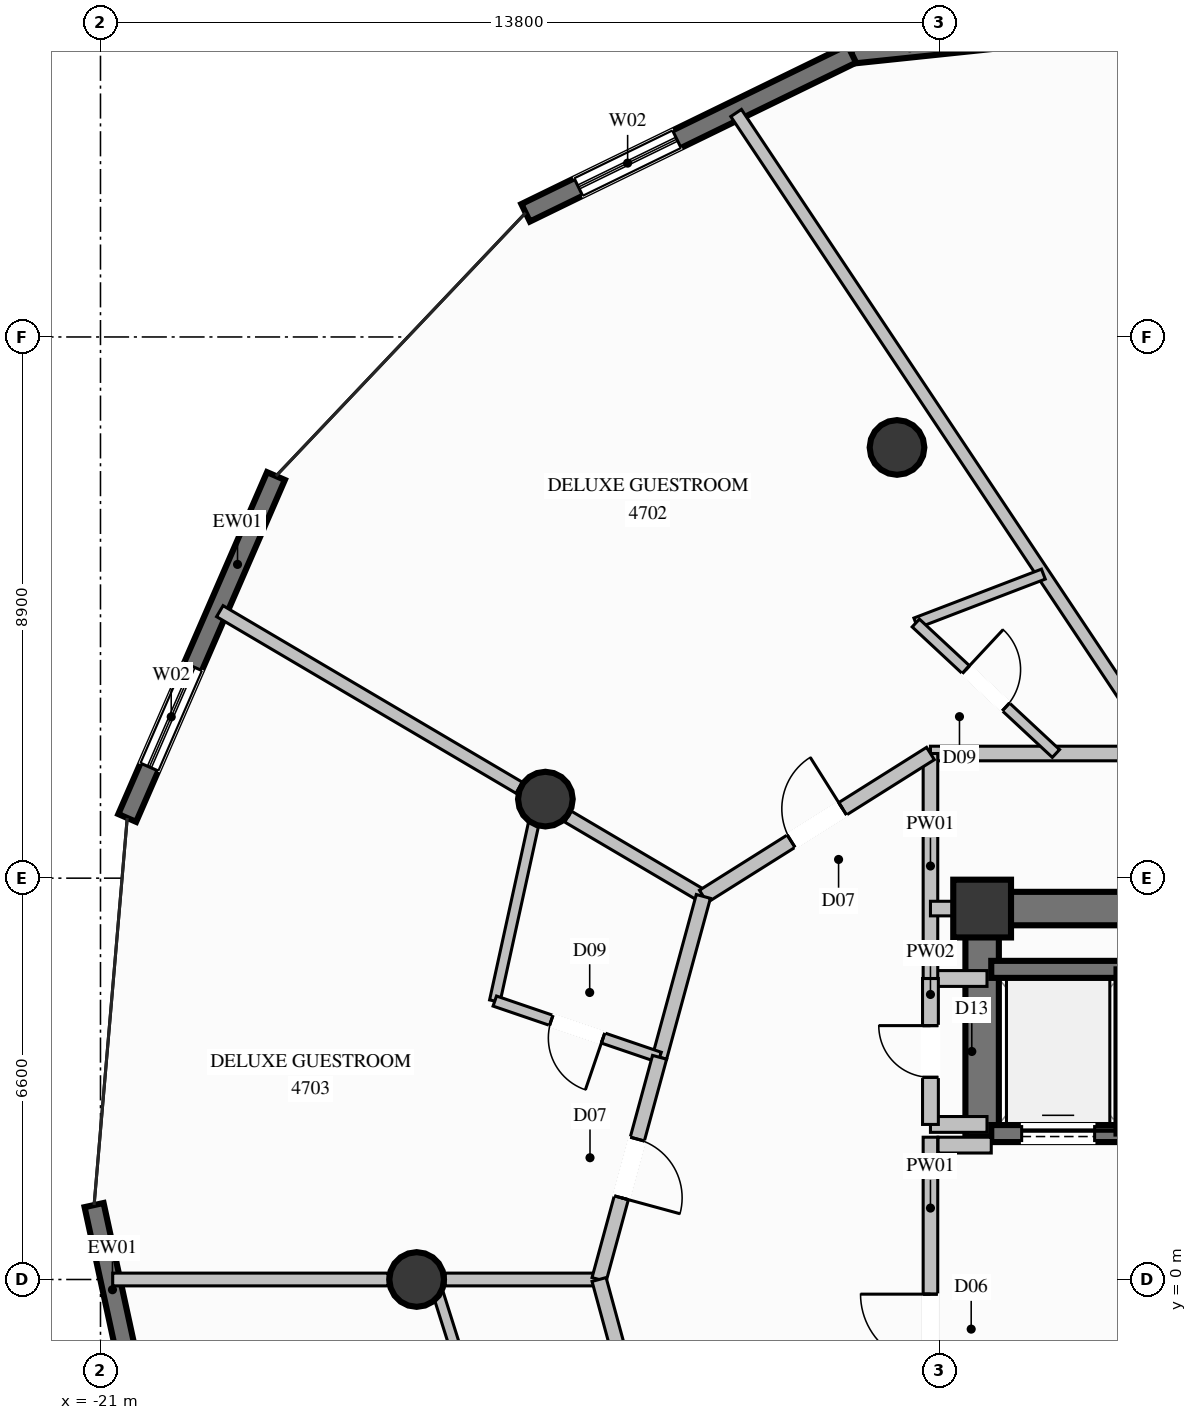
"""IFC4 building model, lengths in metres.
Left out: names, types, materials, properties, quantities, classifications, styles, units other than length and angle.
Written with IfcOpenShell. Run it as: python <this file> out.ifc"""

import sys

from ifc_helpers import new_model, si_unit, direction, frame, frame_2d, origin, origin_2d, place, context, subcontext, project, spatial, rectangle, circle, extrude, element, fill, save


model = new_model("IFC4")
c1 = context("Model", 3, precision=1e-05, world=origin(), true_north=direction((0.0, 1.0)))
c2 = subcontext(c1, "Body", "Model", "MODEL_VIEW")
j1 = project(units=[si_unit("LENGTHUNIT", "METRE"), si_unit("PLANEANGLEUNIT", "RADIAN")], contexts=[c1])
p1 = place(None, origin())
s1 = spatial("IfcSite", under=j1, at=p1, CompositionType="ELEMENT")
p2 = place(p1, origin())
s2 = spatial("IfcBuilding", under=s1, at=p2, CompositionType="ELEMENT")
p3 = place(p2, frame((0.0, 0.0, 176.8)))
s3 = spatial("IfcBuildingStorey", under=s2, at=p3, CompositionType="ELEMENT", Elevation=176.8)
p4 = place(p3, frame((-6.5, 6.1, 0.0), z_axis=(0.0, 0.0, 1.0), x_axis=(1.0, 0.0, 0.0)))
e1 = element("IfcColumn", 1, at=p4, inside=s3, PredefinedType="COLUMN", context=c2, shape_type="SweptSolid", body=[
    extrude(rectangle(XDim=0.95, YDim=0.95, at=origin_2d()), origin(), (0.0, 0.0, 1.0), 3.6),
])
p5 = place(p3, frame((-6.225, 6.1, 0.0), z_axis=(0.0, 0.0, 1.0), x_axis=(1.0, 0.0, 0.0)))
e2 = element("IfcWall", 2, at=p5, inside=s3, PredefinedType="SHEAR", context=c2, shape_type="SweptSolid", body=[
    extrude(rectangle(XDim=2.625, YDim=0.55, at=frame_2d((1.312, 0.0))), origin(), (0.0, 0.0, 1.0), 3.6),
])
p6 = place(p3, frame((-6.5, 2.35, 0.0), z_axis=(0.0, 0.0, 1.0), x_axis=(0.0, 1.0, 0.0)))
e3 = element("IfcWall", 3, at=p6, inside=s3, PredefinedType="SHEAR", context=c2, shape_type="SweptSolid", body=[
    extrude(rectangle(XDim=4.025, YDim=0.55, at=frame_2d((2.012, 0.0))), origin(), (0.0, 0.0, 1.0), 3.6),
])
for number, where, z_axis, x_axis in (
    (4, (-7.9, 13.683, 0.0), (0.0, 0.0, 1.0), (1.0, 0.0, 0.0)),
    (5, (-13.683, 7.9, 0.0), (0.0, 0.0, 1.0), (1.0, 0.0, 0.0)),
    (6, (-15.8, 0.0, 0.0), (0.0, 0.0, 1.0), (1.0, 0.0, 0.0)),
):
    element("IfcColumn", number, at=place(p3, frame(where, z_axis=z_axis, x_axis=x_axis)), inside=s3, PredefinedType="COLUMN", context=c2, shape_type="SweptSolid", body=[
        extrude(circle(Radius=0.45, at=origin_2d()), origin(), (0.0, 0.0, 1.0), 3.6),
    ])
p7 = place(p3, frame((-8.643, 20.155, 0.0), z_axis=(0.0, 0.0, 1.0), x_axis=(0.994556170884, 0.104201837585, 0.0)))
e7 = element("IfcWall", 7, at=p7, inside=s3, PredefinedType="SOLIDWALL", context=c2, shape_type="SweptSolid", body=[
    extrude(rectangle(XDim=6.132, YDim=0.32, at=frame_2d((3.066, 0.0))), origin(), (0.0, 0.0, 1.0), 3.36),
])
p8 = place(p7, frame((2.166, 0.0, 0.35)))
e8 = element("IfcOpeningElement", 8, at=p8, cuts=e7, PredefinedType="OPENING", context=c2, shape_type="SweptSolid", body=[
    extrude(rectangle(XDim=1.8, YDim=2.6, at=frame_2d((0.9, 1.3))), frame((0.0, 0.17, 0.0), z_axis=(0.0, -1.0, 0.0), x_axis=(1.0, 0.0, 0.0)), (0.0, 0.0, 1.0), 0.34),
])
p9 = place(p3, frame((-14.008, 17.542, 0.0), z_axis=(0.0, 0.0, 1.0), x_axis=(0.899034471399, 0.437877858811, 0.0)))
e9 = element("IfcWall", 9, at=p9, inside=s3, PredefinedType="SOLIDWALL", context=c2, shape_type="SweptSolid", body=[
    extrude(rectangle(XDim=5.968, YDim=0.32, at=frame_2d((2.984, 0.0))), origin(), (0.0, 0.0, 1.0), 3.36),
])
p10 = place(p9, frame((0.966, 0.0, 0.35)))
e10 = element("IfcOpeningElement", 10, at=p10, cuts=e9, PredefinedType="OPENING", context=c2, shape_type="SweptSolid", body=[
    extrude(rectangle(XDim=1.8, YDim=2.6, at=frame_2d((0.9, 1.3))), frame((0.0, 0.17, 0.0), z_axis=(0.0, -1.0, 0.0), x_axis=(1.0, 0.0, 0.0)), (0.0, 0.0, 1.0), 0.34),
])
p11 = place(p3, frame((-20.56, 7.59, 0.0), z_axis=(0.0, 0.0, 1.0), x_axis=(0.398911001453, 0.916989647117, 0.0)))
e11 = element("IfcWall", 11, at=p11, inside=s3, PredefinedType="SOLIDWALL", context=c2, shape_type="SweptSolid", body=[
    extrude(rectangle(XDim=6.132, YDim=0.32, at=frame_2d((3.066, 0.0))), origin(), (0.0, 0.0, 1.0), 3.36),
])
p12 = place(p11, frame((0.913, 0.0, 0.35)))
e12 = element("IfcOpeningElement", 12, at=p12, cuts=e11, PredefinedType="OPENING", context=c2, shape_type="SweptSolid", body=[
    extrude(rectangle(XDim=1.8, YDim=2.6, at=frame_2d((0.9, 1.3))), frame((0.0, 0.17, 0.0), z_axis=(0.0, -1.0, 0.0), x_axis=(1.0, 0.0, 0.0)), (0.0, 0.0, 1.0), 0.34),
])
p13 = place(p3, frame((-19.698, -5.262, 0.0), z_axis=(0.0, 0.0, 1.0), x_axis=(-0.211992849193, 0.977271217161, 0.0)))
e13 = element("IfcWall", 13, at=p13, inside=s3, PredefinedType="SOLIDWALL", context=c2, shape_type="SweptSolid", body=[
    extrude(rectangle(XDim=6.637, YDim=0.32, at=frame_2d((3.318, 0.0))), origin(), (0.0, 0.0, 1.0), 3.36),
])
p14 = place(p13, frame((1.738, 0.0, 0.35)))
e14 = element("IfcOpeningElement", 14, at=p14, cuts=e13, PredefinedType="OPENING", context=c2, shape_type="SweptSolid", body=[
    extrude(rectangle(XDim=1.8, YDim=2.6, at=frame_2d((0.9, 1.3))), frame((0.0, 0.17, 0.0), z_axis=(0.0, -1.0, 0.0), x_axis=(1.0, 0.0, 0.0)), (0.0, 0.0, 1.0), 0.34),
])
p15 = place(p3, frame((-6.35, 2.4, 0.0), z_axis=(0.0, 0.0, 1.0), x_axis=(1.0, 0.0, 0.0)))
e15 = element("IfcWall", 15, at=p15, inside=s3, PredefinedType="SOLIDWALL", context=c2, shape_type="SweptSolid", body=[
    extrude(rectangle(XDim=2.2, YDim=0.28, at=frame_2d((1.1, 0.0))), origin(), (0.0, 0.0, 1.0), 3.36),
])
p16 = place(p15, frame((0.5, 0.0, 0.0)))
e16 = element("IfcOpeningElement", 16, at=p16, cuts=e15, PredefinedType="OPENING", context=c2, shape_type="SweptSolid", body=[
    extrude(rectangle(XDim=1.2, YDim=2.2, at=frame_2d((0.6, 1.1))), frame((0.0, 0.15, 0.0), z_axis=(0.0, -1.0, 0.0), x_axis=(1.0, 0.0, 0.0)), (0.0, 0.0, 1.0), 0.3),
])
p17 = place(p3, frame((-4.15, 5.1, 0.0), z_axis=(0.0, 0.0, 1.0), x_axis=(-1.0, 0.0, 0.0)))
e17 = element("IfcWall", 17, at=p17, inside=s3, PredefinedType="SOLIDWALL", context=c2, shape_type="SweptSolid", body=[
    extrude(rectangle(XDim=2.2, YDim=0.28, at=frame_2d((1.1, 0.0))), origin(), (0.0, 0.0, 1.0), 3.36),
])
p18 = place(p3, frame((-4.15, 2.4, 0.0), z_axis=(0.0, 0.0, 1.0), x_axis=(0.0, 1.0, 0.0)))
e18 = element("IfcWall", 18, at=p18, inside=s3, PredefinedType="SOLIDWALL", context=c2, shape_type="SweptSolid", body=[
    extrude(rectangle(XDim=2.7, YDim=0.28, at=frame_2d((1.35, 0.0))), origin(), (0.0, 0.0, 1.0), 3.36),
])
p19 = place(p3, frame((-7.35, -2.78, 0.0), z_axis=(0.0, 0.0, 1.0), x_axis=(0.0, 1.0, 0.0)))
e19 = element("IfcWall", 19, at=p19, inside=s3, PredefinedType="PARTITIONING", context=c2, shape_type="SweptSolid", body=[
    extrude(rectangle(XDim=5.12, YDim=0.24, at=frame_2d((2.56, 0.0))), origin(), (0.0, 0.0, 1.0), 2.445),
])
p20 = place(p19, frame((1.389, 0.0, 0.0)))
e20 = element("IfcOpeningElement", 20, at=p20, cuts=e19, PredefinedType="OPENING", context=c2, shape_type="SweptSolid", body=[
    extrude(rectangle(XDim=1.15, YDim=2.2, at=frame_2d((0.575, 1.1))), frame((0.0, 0.13, 0.0), z_axis=(0.0, -1.0, 0.0), x_axis=(1.0, 0.0, 0.0)), (0.0, 0.0, 1.0), 0.26),
])
p21 = place(p3, frame((-7.225, 2.21, 0.0), z_axis=(0.0, 0.0, 1.0), x_axis=(1.0, 0.0, 0.0)))
e21 = element("IfcWall", 21, at=p21, inside=s3, PredefinedType="PARTITIONING", context=c2, shape_type="SweptSolid", body=[
    extrude(rectangle(XDim=0.875, YDim=0.26, at=frame_2d((0.438, 0.0))), origin(), (0.0, 0.0, 1.0), 3.36),
])
for number, where, z_axis, x_axis in (
    (22, (-7.35, 4.95, 0.0), (0.0, 0.0, 1.0), (1.0, 0.0, 0.0)),
    (23, (-7.35, 2.55, 0.0), (0.0, 0.0, 1.0), (1.0, 0.0, 0.0)),
):
    element("IfcWall", number, at=place(p3, frame(where, z_axis=z_axis, x_axis=x_axis)), inside=s3, PredefinedType="PARTITIONING", context=c2, shape_type="SweptSolid", body=[
        extrude(rectangle(XDim=0.93, YDim=0.26, at=frame_2d((0.465, 0.0))), origin(), (0.0, 0.0, 1.0), 3.36),
    ])
p22 = place(p3, frame((-7.35, 2.55, 0.0), z_axis=(0.0, 0.0, 1.0), x_axis=(0.0, 1.0, 0.0)))
e24 = element("IfcWall", 24, at=p22, inside=s3, PredefinedType="PARTITIONING", context=c2, shape_type="SweptSolid", body=[
    extrude(rectangle(XDim=2.4, YDim=0.26, at=frame_2d((1.2, 0.0))), origin(), (0.0, 0.0, 1.0), 2.445),
])
p23 = place(p22, frame((0.775, 0.0, 0.0)))
e25 = element("IfcOpeningElement", 25, at=p23, cuts=e24, PredefinedType="OPENING", context=c2, shape_type="SweptSolid", body=[
    extrude(rectangle(XDim=0.85, YDim=2.05, at=frame_2d((0.425, 1.025))), frame((0.0, 0.14, 0.0), z_axis=(0.0, -1.0, 0.0), x_axis=(1.0, 0.0, 0.0)), (0.0, 0.0, 1.0), 0.28),
])
p24 = place(p3, frame((-7.35, 8.65, 0.0), z_axis=(0.0, 0.0, 1.0), x_axis=(1.0, 0.0, 0.0)))
e26 = element("IfcWall", 26, at=p24, inside=s3, PredefinedType="PARTITIONING", context=c2, shape_type="SweptSolid", body=[
    extrude(rectangle(XDim=14.7, YDim=0.24, at=frame_2d((7.35, 0.0))), origin(), (0.0, 0.0, 1.0), 3.36),
])
p25 = place(p3, frame((-7.35, 4.95, 0.0), z_axis=(0.0, 0.0, 1.0), x_axis=(0.0, 1.0, 0.0)))
e27 = element("IfcWall", 27, at=p25, inside=s3, PredefinedType="PARTITIONING", context=c2, shape_type="SweptSolid", body=[
    extrude(rectangle(XDim=3.7, YDim=0.24, at=frame_2d((1.85, 0.0))), origin(), (0.0, 0.0, 1.0), 2.445),
])
p26 = place(p3, frame((-7.35, 6.1, 0.0), z_axis=(0.0, 0.0, 1.0), x_axis=(1.0, 0.0, 0.0)))
e28 = element("IfcWall", 28, at=p26, inside=s3, PredefinedType="PARTITIONING", context=c2, shape_type="SweptSolid", body=[
    extrude(rectangle(XDim=0.85, YDim=0.24, at=frame_2d((0.425, 0.0))), origin(), (0.0, 0.0, 1.0), 2.876),
])
p27 = place(p3, frame((-11.085, 6.3, 0.0), z_axis=(0.0, 0.0, 1.0), x_axis=(-0.86133622593, 0.508035339225, 0.0)))
e29 = element("IfcWall", 29, at=p27, inside=s3, PredefinedType="PARTITIONING", context=c2, shape_type="SweptSolid", body=[
    extrude(rectangle(XDim=2.584, YDim=0.21, at=frame_2d((1.292, 0.0))), origin(), (0.0, 0.0, 1.0), 2.876),
])
p28 = place(p3, frame((-14.114, 8.087, 0.0), z_axis=(0.0, 0.0, 1.0), x_axis=(-0.861313184314, 0.50807440255, 0.0)))
e30 = element("IfcWall", 30, at=p28, inside=s3, PredefinedType="PARTITIONING", context=c2, shape_type="SweptSolid", body=[
    extrude(rectangle(XDim=5.716, YDim=0.21, at=frame_2d((2.858, 0.0))), origin(), (0.0, 0.0, 1.0), 3.36),
])
p29 = place(p3, frame((-12.8, 0.0, 0.0), z_axis=(0.0, 0.0, 1.0), x_axis=(-1.0, 0.0, 0.0)))
e31 = element("IfcWall", 31, at=p29, inside=s3, PredefinedType="PARTITIONING", context=c2, shape_type="SweptSolid", body=[
    extrude(rectangle(XDim=2.53, YDim=0.21, at=frame_2d((1.265, 0.0))), origin(), (0.0, 0.0, 1.0), 3.36),
])
p30 = place(p3, frame((-16.27, 0.0, 0.0), z_axis=(0.0, 0.0, 1.0), x_axis=(-1.0, 0.0, 0.0)))
e32 = element("IfcWall", 32, at=p30, inside=s3, PredefinedType="PARTITIONING", context=c2, shape_type="SweptSolid", body=[
    extrude(rectangle(XDim=4.529, YDim=0.21, at=frame_2d((2.265, 0.0))), origin(), (0.0, 0.0, 1.0), 3.36),
])
p31 = place(p3, frame((-3.528, 8.65, 0.0), z_axis=(0.0, 0.0, 1.0), x_axis=(-0.554428653403, 0.832231258898, 0.0)))
e33 = element("IfcWall", 33, at=p31, inside=s3, PredefinedType="PARTITIONING", context=c2, shape_type="SweptSolid", body=[
    extrude(rectangle(XDim=12.658, YDim=0.21, at=frame_2d((6.329, 0.0))), origin(), (0.0, 0.0, 1.0), 3.36),
])
p32 = place(p3, frame((-7.591, 10.796, 0.0), z_axis=(0.0, 0.0, 1.0), x_axis=(0.933759431782, 0.357901276273, 0.0)))
e34 = element("IfcWall", 34, at=p32, inside=s3, PredefinedType="PLUMBINGWALL", context=c2, shape_type="SweptSolid", body=[
    extrude(rectangle(XDim=2.247, YDim=0.175, at=frame_2d((1.124, 0.0))), origin(), (0.0, 0.0, 1.0), 3.36),
])
p33 = place(p3, frame((-7.591, 10.796, 0.0), z_axis=(0.0, 0.0, 1.0), x_axis=(0.731925968359, -0.681384162453, 0.0)))
e35 = element("IfcWall", 35, at=p33, inside=s3, PredefinedType="PLUMBINGWALL", context=c2, shape_type="SweptSolid", body=[
    extrude(rectangle(XDim=3.149, YDim=0.175, at=frame_2d((1.575, 0.0))), origin(), (0.0, 0.0, 1.0), 3.36),
])
p34 = place(p33, frame((1.125, 0.0, 0.0)))
e36 = element("IfcOpeningElement", 36, at=p34, cuts=e35, PredefinedType="OPENING", context=c2, shape_type="SweptSolid", body=[
    extrude(rectangle(XDim=0.9, YDim=2.1, at=frame_2d((0.45, 1.05))), frame((0.0, 0.098, 0.0), z_axis=(0.0, -1.0, 0.0), x_axis=(1.0, 0.0, 0.0)), (0.0, 0.0, 1.0), 0.195),
])
p35 = place(p3, frame((-11.085, 6.3, 0.0), z_axis=(0.0, 0.0, 1.0), x_axis=(0.846409267484, 0.532532958526, 0.0)))
e37 = element("IfcWall", 37, at=p35, inside=s3, PredefinedType="PARTITIONING", context=c2, shape_type="SweptSolid", body=[
    extrude(rectangle(XDim=4.413, YDim=0.24, at=frame_2d((2.206, 0.0))), origin(), (0.0, 0.0, 1.0), 3.36),
])
p36 = place(p35, frame((1.706, 0.0, 0.0)))
e38 = element("IfcOpeningElement", 38, at=p36, cuts=e37, PredefinedType="OPENING", context=c2, shape_type="SweptSolid", body=[
    extrude(rectangle(XDim=1.0, YDim=2.2, at=frame_2d((0.5, 1.1))), frame((0.0, 0.13, 0.0), z_axis=(0.0, -1.0, 0.0), x_axis=(1.0, 0.0, 0.0)), (0.0, 0.0, 1.0), 0.26),
])
p37 = place(p3, frame((-11.085, 6.3, 0.0), z_axis=(0.0, 0.0, 1.0), x_axis=(-0.262552356383, -0.964917747872, 0.0)))
e39 = element("IfcWall", 39, at=p37, inside=s3, PredefinedType="PARTITIONING", context=c2, shape_type="SweptSolid", body=[
    extrude(rectangle(XDim=2.742, YDim=0.24, at=frame_2d((1.371, 0.0))), origin(), (0.0, 0.0, 1.0), 3.36),
])
p38 = place(p3, frame((-13.789, 7.895, 0.0), z_axis=(0.0, 0.0, 1.0), x_axis=(-0.213829865727, -0.976870917022, 0.0)))
e40 = element("IfcWall", 40, at=p38, inside=s3, PredefinedType="PLUMBINGWALL", context=c2, shape_type="SweptSolid", body=[
    extrude(rectangle(XDim=3.395, YDim=0.175, at=frame_2d((1.697, 0.0))), origin(), (0.0, 0.0, 1.0), 2.929),
])
p39 = place(p3, frame((-11.805, 3.654, 0.0), z_axis=(0.0, 0.0, 1.0), x_axis=(-0.946382283588, 0.323048871398, 0.0)))
e41 = element("IfcWall", 41, at=p39, inside=s3, PredefinedType="PLUMBINGWALL", context=c2, shape_type="SweptSolid", body=[
    extrude(rectangle(XDim=2.864, YDim=0.175, at=frame_2d((1.432, 0.0))), origin(), (0.0, 0.0, 1.0), 3.36),
])
p40 = place(p39, frame((0.982, 0.0, 0.0)))
e42 = element("IfcOpeningElement", 42, at=p40, cuts=e41, PredefinedType="OPENING", context=c2, shape_type="SweptSolid", body=[
    extrude(rectangle(XDim=0.9, YDim=2.1, at=frame_2d((0.45, 1.05))), frame((0.0, 0.098, 0.0), z_axis=(0.0, -1.0, 0.0), x_axis=(1.0, 0.0, 0.0)), (0.0, 0.0, 1.0), 0.195),
])
p41 = place(p3, frame((-11.805, 3.654, 0.0), z_axis=(0.0, 0.0, 1.0), x_axis=(-0.262762825819, -0.964860454868, 0.0)))
e43 = element("IfcWall", 43, at=p41, inside=s3, PredefinedType="PARTITIONING", context=c2, shape_type="SweptSolid", body=[
    extrude(rectangle(XDim=3.787, YDim=0.24, at=frame_2d((1.894, 0.0))), origin(), (0.0, 0.0, 1.0), 3.36),
])
p42 = place(p41, frame((1.394, 0.0, 0.0)))
e44 = element("IfcOpeningElement", 44, at=p42, cuts=e43, PredefinedType="OPENING", context=c2, shape_type="SweptSolid", body=[
    extrude(rectangle(XDim=1.0, YDim=2.2, at=frame_2d((0.5, 1.1))), frame((0.0, 0.13, 0.0), z_axis=(0.0, -1.0, 0.0), x_axis=(1.0, 0.0, 0.0)), (0.0, 0.0, 1.0), 0.26),
])
p43 = place(p3, frame((-12.8, 0.0, 0.0), z_axis=(0.0, 0.0, 1.0), x_axis=(0.262552356383, -0.964917747872, 0.0)))
e45 = element("IfcWall", 45, at=p43, inside=s3, PredefinedType="PARTITIONING", context=c2, shape_type="SweptSolid", body=[
    extrude(rectangle(XDim=2.742, YDim=0.24, at=frame_2d((1.371, 0.0))), origin(), (0.0, 0.0, 1.0), 3.36),
])
p44 = place(p3, frame((-15.52, 0.0, 0.0), z_axis=(0.0, 0.0, 1.0), x_axis=(0.300912730095, -0.953651681101, 0.0)))
e46 = element("IfcWall", 46, at=p44, inside=s3, PredefinedType="PLUMBINGWALL", context=c2, shape_type="SweptSolid", body=[
    extrude(rectangle(XDim=3.313, YDim=0.175, at=frame_2d((1.657, 0.0))), origin(), (0.0, 0.0, 1.0), 2.929),
])
p45 = place(p10, origin())
e47 = element("IfcWindow", 47, at=p45, inside=s3, PartitioningType="SINGLE_PANEL", PredefinedType="WINDOW", context=c2, shape_type="SweptSolid", body=[
    extrude(rectangle(XDim=1.8, YDim=2.6, at=frame_2d((0.9, 1.3))), frame((0.0, 0.03, 0.0), z_axis=(0.0, -1.0, 0.0), x_axis=(1.0, 0.0, 0.0)), (0.0, 0.0, 1.0), 0.06),
])
fill(e10, e47)
p46 = place(p12, origin())
e48 = element("IfcWindow", 48, at=p46, inside=s3, PartitioningType="SINGLE_PANEL", PredefinedType="WINDOW", context=c2, shape_type="SweptSolid", body=[
    extrude(rectangle(XDim=1.8, YDim=2.6, at=frame_2d((0.9, 1.3))), frame((0.0, 0.03, 0.0), z_axis=(0.0, -1.0, 0.0), x_axis=(1.0, 0.0, 0.0)), (0.0, 0.0, 1.0), 0.06),
])
fill(e12, e48)
p47 = place(p16, origin())
e49 = element("IfcDoor", 49, at=p47, inside=s3, OperationType="SLIDING_TO_LEFT", PredefinedType="DOOR", context=c2, shape_type="SweptSolid", body=[
    extrude(rectangle(XDim=1.2, YDim=2.2, at=frame_2d((0.6, 1.1))), frame((0.0, 0.025, 0.0), z_axis=(0.0, -1.0, 0.0), x_axis=(1.0, 0.0, 0.0)), (0.0, 0.0, 1.0), 0.05),
])
fill(e16, e49)
p48 = place(p20, origin())
e50 = element("IfcDoor", 50, at=p48, inside=s3, OperationType="SINGLE_SWING_RIGHT", PredefinedType="DOOR", context=c2, shape_type="SweptSolid", body=[
    extrude(rectangle(XDim=1.15, YDim=2.2, at=frame_2d((0.575, 1.1))), frame((0.0, 0.025, 0.0), z_axis=(0.0, -1.0, 0.0), x_axis=(1.0, 0.0, 0.0)), (0.0, 0.0, 1.0), 0.05),
])
fill(e20, e50)
p49 = place(p23, origin())
e51 = element("IfcDoor", 51, at=p49, inside=s3, OperationType="SINGLE_SWING_RIGHT", PredefinedType="DOOR", context=c2, shape_type="SweptSolid", body=[
    extrude(rectangle(XDim=0.85, YDim=2.05, at=frame_2d((0.425, 1.025))), frame((0.0, 0.025, 0.0), z_axis=(0.0, -1.0, 0.0), x_axis=(1.0, 0.0, 0.0)), (0.0, 0.0, 1.0), 0.05),
])
fill(e25, e51)
p50 = place(p34, origin())
e52 = element("IfcDoor", 52, at=p50, inside=s3, OperationType="SINGLE_SWING_LEFT", PredefinedType="DOOR", context=c2, shape_type="SweptSolid", body=[
    extrude(rectangle(XDim=0.9, YDim=2.1, at=frame_2d((0.45, 1.05))), frame((0.0, 0.025, 0.0), z_axis=(0.0, -1.0, 0.0), x_axis=(1.0, 0.0, 0.0)), (0.0, 0.0, 1.0), 0.05),
])
fill(e36, e52)
p51 = place(p36, origin())
e53 = element("IfcDoor", 53, at=p51, inside=s3, OperationType="SINGLE_SWING_RIGHT", PredefinedType="DOOR", context=c2, shape_type="SweptSolid", body=[
    extrude(rectangle(XDim=1.0, YDim=2.2, at=frame_2d((0.5, 1.1))), frame((0.0, 0.025, 0.0), z_axis=(0.0, -1.0, 0.0), x_axis=(1.0, 0.0, 0.0)), (0.0, 0.0, 1.0), 0.05),
])
fill(e38, e53)
p52 = place(p40, origin())
e54 = element("IfcDoor", 54, at=p52, inside=s3, OperationType="SINGLE_SWING_LEFT", PredefinedType="DOOR", context=c2, shape_type="SweptSolid", body=[
    extrude(rectangle(XDim=0.9, YDim=2.1, at=frame_2d((0.45, 1.05))), frame((0.0, 0.025, 0.0), z_axis=(0.0, -1.0, 0.0), x_axis=(1.0, 0.0, 0.0)), (0.0, 0.0, 1.0), 0.05),
])
fill(e42, e54)
p53 = place(p42, origin())
e55 = element("IfcDoor", 55, at=p53, inside=s3, OperationType="SINGLE_SWING_RIGHT", PredefinedType="DOOR", context=c2, shape_type="SweptSolid", body=[
    extrude(rectangle(XDim=1.0, YDim=2.2, at=frame_2d((0.5, 1.1))), frame((0.0, 0.025, 0.0), z_axis=(0.0, -1.0, 0.0), x_axis=(1.0, 0.0, 0.0)), (0.0, 0.0, 1.0), 0.05),
])
fill(e44, e55)
save(model, sys.argv[1])
